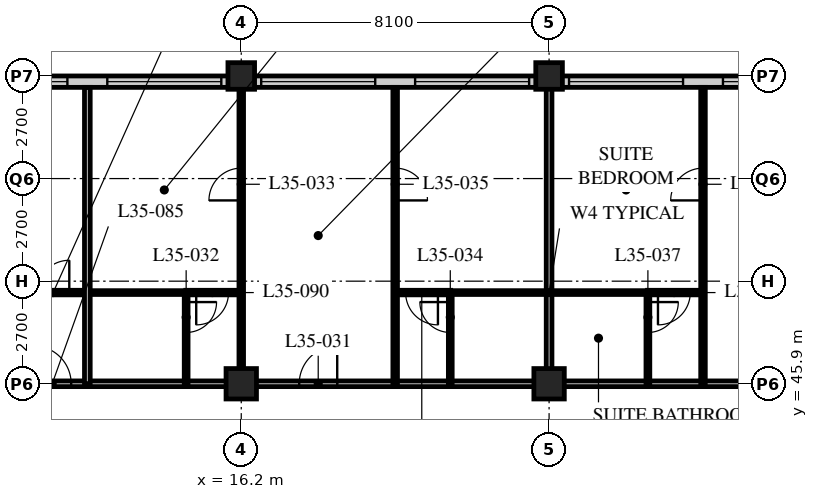
"""IFC4 building model, lengths in metres.
Left out: names, types, materials, properties, quantities, classifications, styles, units other than length and angle.
Written with IfcOpenShell. Run it as: python <this file> out.ifc"""

import sys

from ifc_helpers import new_model, si_unit, direction, frame, frame_2d, origin, origin_2d, place, context, subcontext, project, spatial, rectangle, hollow_rectangle, extrude, element, fill, save


model = new_model("IFC4")
c1 = context("Model", 3, precision=1e-05, world=origin(), true_north=direction((0.0, 1.0)))
c2 = subcontext(c1, "Body", "Model", "MODEL_VIEW")
j1 = project(units=[si_unit("LENGTHUNIT", "METRE"), si_unit("PLANEANGLEUNIT", "RADIAN")], contexts=[c1])
p1 = place(None, origin())
s1 = spatial("IfcSite", under=j1, at=p1, CompositionType="ELEMENT")
p2 = place(p1, origin())
s2 = spatial("IfcBuilding", under=s1, at=p2, CompositionType="ELEMENT")
p3 = place(p2, frame((0.0, 0.0, 137.4)))
s3 = spatial("IfcBuildingStorey", under=s2, at=p3, CompositionType="ELEMENT", Elevation=137.4)
p4 = place(p3, frame((16.2, 45.9, 0.0), z_axis=(0.0, 0.0, 1.0), x_axis=(1.0, 0.0, 0.0)))
e1 = element("IfcColumn", 1, at=p4, inside=s3, PredefinedType="COLUMN", context=c2, shape_type="SweptSolid", body=[
    extrude(hollow_rectangle(XDim=0.8, YDim=0.8, WallThickness=0.08, at=origin_2d()), origin(), (0.0, 0.0, 1.0), 3.4),
])
p5 = place(p3, frame((16.2, 54.0, 0.0), z_axis=(0.0, 0.0, 1.0), x_axis=(1.0, 0.0, 0.0)))
e2 = element("IfcColumn", 2, at=p5, inside=s3, PredefinedType="COLUMN", context=c2, shape_type="SweptSolid", body=[
    extrude(hollow_rectangle(XDim=0.7, YDim=0.7, WallThickness=0.07, at=origin_2d()), origin(), (0.0, 0.0, 1.0), 3.4),
])
p6 = place(p3, frame((24.3, 45.9, 0.0), z_axis=(0.0, 0.0, 1.0), x_axis=(1.0, 0.0, 0.0)))
e3 = element("IfcColumn", 3, at=p6, inside=s3, PredefinedType="COLUMN", context=c2, shape_type="SweptSolid", body=[
    extrude(hollow_rectangle(XDim=0.8, YDim=0.8, WallThickness=0.08, at=origin_2d()), origin(), (0.0, 0.0, 1.0), 3.4),
])
p7 = place(p3, frame((24.3, 54.0, 0.0), z_axis=(0.0, 0.0, 1.0), x_axis=(1.0, 0.0, 0.0)))
e4 = element("IfcColumn", 4, at=p7, inside=s3, PredefinedType="COLUMN", context=c2, shape_type="SweptSolid", body=[
    extrude(hollow_rectangle(XDim=0.7, YDim=0.7, WallThickness=0.07, at=origin_2d()), origin(), (0.0, 0.0, 1.0), 3.4),
])
p8 = place(p3, frame((48.3, 53.85, 0.0), z_axis=(0.0, 0.0, 1.0), x_axis=(-1.0, 0.0, 0.0)))
e5 = element("IfcWall", 5, at=p8, inside=s3, PredefinedType="SOLIDWALL", context=c2, shape_type="SweptSolid", body=[
    extrude(rectangle(XDim=40.2, YDim=0.3, at=frame_2d((20.1, 0.0))), origin(), (0.0, 0.0, 1.0), 3.19),
])
p9 = place(p8, frame((0.225, 0.0, 0.9)))
e6 = element("IfcOpeningElement", 6, at=p9, cuts=e5, PredefinedType="OPENING", context=c2, shape_type="SweptSolid", body=[
    extrude(rectangle(XDim=3.0, YDim=2.0, at=frame_2d((1.5, 1.0))), frame((0.0, 0.16, 0.0), z_axis=(0.0, -1.0, 0.0), x_axis=(1.0, 0.0, 0.0)), (0.0, 0.0, 1.0), 0.32),
])
p10 = place(p8, frame((4.275, 0.0, 0.9)))
e7 = element("IfcOpeningElement", 7, at=p10, cuts=e5, PredefinedType="OPENING", context=c2, shape_type="SweptSolid", body=[
    extrude(rectangle(XDim=3.0, YDim=2.0, at=frame_2d((1.5, 1.0))), frame((0.0, 0.16, 0.0), z_axis=(0.0, -1.0, 0.0), x_axis=(1.0, 0.0, 0.0)), (0.0, 0.0, 1.0), 0.32),
])
p11 = place(p8, frame((8.325, 0.0, 0.9)))
e8 = element("IfcOpeningElement", 8, at=p11, cuts=e5, PredefinedType="OPENING", context=c2, shape_type="SweptSolid", body=[
    extrude(rectangle(XDim=3.0, YDim=2.0, at=frame_2d((1.5, 1.0))), frame((0.0, 0.16, 0.0), z_axis=(0.0, -1.0, 0.0), x_axis=(1.0, 0.0, 0.0)), (0.0, 0.0, 1.0), 0.32),
])
p12 = place(p8, frame((12.375, 0.0, 0.9)))
e9 = element("IfcOpeningElement", 9, at=p12, cuts=e5, PredefinedType="OPENING", context=c2, shape_type="SweptSolid", body=[
    extrude(rectangle(XDim=3.0, YDim=2.0, at=frame_2d((1.5, 1.0))), frame((0.0, 0.16, 0.0), z_axis=(0.0, -1.0, 0.0), x_axis=(1.0, 0.0, 0.0)), (0.0, 0.0, 1.0), 0.32),
])
p13 = place(p8, frame((16.425, 0.0, 0.9)))
e10 = element("IfcOpeningElement", 10, at=p13, cuts=e5, PredefinedType="OPENING", context=c2, shape_type="SweptSolid", body=[
    extrude(rectangle(XDim=3.0, YDim=2.0, at=frame_2d((1.5, 1.0))), frame((0.0, 0.16, 0.0), z_axis=(0.0, -1.0, 0.0), x_axis=(1.0, 0.0, 0.0)), (0.0, 0.0, 1.0), 0.32),
])
p14 = place(p8, frame((20.475, 0.0, 0.9)))
e11 = element("IfcOpeningElement", 11, at=p14, cuts=e5, PredefinedType="OPENING", context=c2, shape_type="SweptSolid", body=[
    extrude(rectangle(XDim=3.0, YDim=2.0, at=frame_2d((1.5, 1.0))), frame((0.0, 0.16, 0.0), z_axis=(0.0, -1.0, 0.0), x_axis=(1.0, 0.0, 0.0)), (0.0, 0.0, 1.0), 0.32),
])
p15 = place(p8, frame((24.525, 0.0, 0.9)))
e12 = element("IfcOpeningElement", 12, at=p15, cuts=e5, PredefinedType="OPENING", context=c2, shape_type="SweptSolid", body=[
    extrude(rectangle(XDim=3.0, YDim=2.0, at=frame_2d((1.5, 1.0))), frame((0.0, 0.16, 0.0), z_axis=(0.0, -1.0, 0.0), x_axis=(1.0, 0.0, 0.0)), (0.0, 0.0, 1.0), 0.32),
])
p16 = place(p8, frame((28.575, 0.0, 0.9)))
e13 = element("IfcOpeningElement", 13, at=p16, cuts=e5, PredefinedType="OPENING", context=c2, shape_type="SweptSolid", body=[
    extrude(rectangle(XDim=3.0, YDim=2.0, at=frame_2d((1.5, 1.0))), frame((0.0, 0.16, 0.0), z_axis=(0.0, -1.0, 0.0), x_axis=(1.0, 0.0, 0.0)), (0.0, 0.0, 1.0), 0.32),
])
p17 = place(p8, frame((32.625, 0.0, 0.9)))
e14 = element("IfcOpeningElement", 14, at=p17, cuts=e5, PredefinedType="OPENING", context=c2, shape_type="SweptSolid", body=[
    extrude(rectangle(XDim=3.0, YDim=2.0, at=frame_2d((1.5, 1.0))), frame((0.0, 0.16, 0.0), z_axis=(0.0, -1.0, 0.0), x_axis=(1.0, 0.0, 0.0)), (0.0, 0.0, 1.0), 0.32),
])
p18 = place(p8, frame((36.675, 0.0, 0.9)))
e15 = element("IfcOpeningElement", 15, at=p18, cuts=e5, PredefinedType="OPENING", context=c2, shape_type="SweptSolid", body=[
    extrude(rectangle(XDim=3.0, YDim=2.0, at=frame_2d((1.5, 1.0))), frame((0.0, 0.16, 0.0), z_axis=(0.0, -1.0, 0.0), x_axis=(1.0, 0.0, 0.0)), (0.0, 0.0, 1.0), 0.32),
])
p19 = place(p3, frame((8.1, 45.9, 0.0), z_axis=(0.0, 0.0, 1.0), x_axis=(1.0, 0.0, 0.0)))
e16 = element("IfcWall", 16, at=p19, inside=s3, PredefinedType="PARTITIONING", context=c2, shape_type="SweptSolid", body=[
    extrude(rectangle(XDim=36.45, YDim=0.15, at=frame_2d((18.225, 0.0))), origin(), (0.0, 0.0, 1.0), 2.578),
])
p20 = place(p19, frame((9.625, 0.0, 0.0)))
e17 = element("IfcOpeningElement", 17, at=p20, cuts=e16, PredefinedType="OPENING", context=c2, shape_type="SweptSolid", body=[
    extrude(rectangle(XDim=1.0, YDim=2.1, at=frame_2d((0.5, 1.05))), frame((0.0, 0.085, 0.0), z_axis=(0.0, -1.0, 0.0), x_axis=(1.0, 0.0, 0.0)), (0.0, 0.0, 1.0), 0.17),
])
p21 = place(p19, frame((21.775, 0.0, 0.0)))
e18 = element("IfcOpeningElement", 18, at=p21, cuts=e16, PredefinedType="OPENING", context=c2, shape_type="SweptSolid", body=[
    extrude(rectangle(XDim=1.0, YDim=2.1, at=frame_2d((0.5, 1.05))), frame((0.0, 0.085, 0.0), z_axis=(0.0, -1.0, 0.0), x_axis=(1.0, 0.0, 0.0)), (0.0, 0.0, 1.0), 0.17),
])
p22 = place(p19, frame((28.95, 0.0, 0.0)))
e19 = element("IfcOpeningElement", 19, at=p22, cuts=e16, PredefinedType="OPENING", context=c2, shape_type="SweptSolid", body=[
    extrude(rectangle(XDim=1.0, YDim=2.1, at=frame_2d((0.5, 1.05))), frame((0.0, 0.085, 0.0), z_axis=(0.0, -1.0, 0.0), x_axis=(1.0, 0.0, 0.0)), (0.0, 0.0, 1.0), 0.17),
])
p23 = place(p19, frame((33.925, 0.0, 0.0)))
e20 = element("IfcOpeningElement", 20, at=p23, cuts=e16, PredefinedType="OPENING", context=c2, shape_type="SweptSolid", body=[
    extrude(rectangle(XDim=1.0, YDim=2.1, at=frame_2d((0.5, 1.05))), frame((0.0, 0.085, 0.0), z_axis=(0.0, -1.0, 0.0), x_axis=(1.0, 0.0, 0.0)), (0.0, 0.0, 1.0), 0.17),
])
p24 = place(p19, frame((2.625, 0.0, 0.0)))
e21 = element("IfcOpeningElement", 21, at=p24, cuts=e16, PredefinedType="OPENING", context=c2, shape_type="SweptSolid", body=[
    extrude(rectangle(XDim=1.0, YDim=2.1, at=frame_2d((0.5, 1.05))), frame((0.0, 0.085, 0.0), z_axis=(0.0, -1.0, 0.0), x_axis=(1.0, 0.0, 0.0)), (0.0, 0.0, 1.0), 0.17),
])
p25 = place(p3, frame((12.15, 48.3, 0.0), z_axis=(0.0, 0.0, 1.0), x_axis=(1.0, 0.0, 0.0)))
e22 = element("IfcWall", 22, at=p25, inside=s3, PredefinedType="PARTITIONING", context=c2, shape_type="SweptSolid", body=[
    extrude(rectangle(XDim=2.6, YDim=0.1, at=frame_2d((1.3, 0.0))), origin(), (0.0, 0.0, 1.0), 3.19),
])
p26 = place(p3, frame((14.75, 45.9, 0.0), z_axis=(0.0, 0.0, 1.0), x_axis=(0.0, 1.0, 0.0)))
e23 = element("IfcWall", 23, at=p26, inside=s3, PredefinedType="PARTITIONING", context=c2, shape_type="SweptSolid", body=[
    extrude(rectangle(XDim=2.4, YDim=0.1, at=frame_2d((1.2, 0.0))), origin(), (0.0, 0.0, 1.0), 3.19),
])
p27 = place(p26, frame((1.35, 0.0, 0.0)))
e24 = element("IfcOpeningElement", 24, at=p27, cuts=e23, PredefinedType="OPENING", context=c2, shape_type="SweptSolid", body=[
    extrude(rectangle(XDim=0.8, YDim=2.1, at=frame_2d((0.4, 1.05))), frame((0.0, 0.06, 0.0), z_axis=(0.0, -1.0, 0.0), x_axis=(1.0, 0.0, 0.0)), (0.0, 0.0, 1.0), 0.12),
])
p28 = place(p3, frame((16.2, 45.9, 0.0), z_axis=(0.0, 0.0, 1.0), x_axis=(0.0, 1.0, 0.0)))
e25 = element("IfcWall", 25, at=p28, inside=s3, PredefinedType="PARTITIONING", context=c2, shape_type="SweptSolid", body=[
    extrude(rectangle(XDim=7.8, YDim=0.12, at=frame_2d((3.9, 0.0))), origin(), (0.0, 0.0, 1.0), 2.578),
])
p29 = place(p28, frame((4.825, 0.0, 0.0)))
e26 = element("IfcOpeningElement", 26, at=p29, cuts=e25, PredefinedType="OPENING", context=c2, shape_type="SweptSolid", body=[
    extrude(rectangle(XDim=0.85, YDim=2.1, at=frame_2d((0.425, 1.05))), frame((0.0, 0.07, 0.0), z_axis=(0.0, -1.0, 0.0), x_axis=(1.0, 0.0, 0.0)), (0.0, 0.0, 1.0), 0.14),
])
p30 = place(p3, frame((21.7, 48.3, 0.0), z_axis=(0.0, 0.0, 1.0), x_axis=(1.0, 0.0, 0.0)))
e27 = element("IfcWall", 27, at=p30, inside=s3, PredefinedType="PARTITIONING", context=c2, shape_type="SweptSolid", body=[
    extrude(rectangle(XDim=5.2, YDim=0.1, at=frame_2d((2.6, 0.0))), origin(), (0.0, 0.0, 1.0), 3.19),
])
p31 = place(p3, frame((21.7, 45.9, 0.0), z_axis=(0.0, 0.0, 1.0), x_axis=(0.0, 1.0, 0.0)))
e28 = element("IfcWall", 28, at=p31, inside=s3, PredefinedType="PARTITIONING", context=c2, shape_type="SweptSolid", body=[
    extrude(rectangle(XDim=2.4, YDim=0.1, at=frame_2d((1.2, 0.0))), origin(), (0.0, 0.0, 1.0), 3.19),
])
p32 = place(p31, frame((1.35, 0.0, 0.0)))
e29 = element("IfcOpeningElement", 29, at=p32, cuts=e28, PredefinedType="OPENING", context=c2, shape_type="SweptSolid", body=[
    extrude(rectangle(XDim=0.8, YDim=2.1, at=frame_2d((0.4, 1.05))), frame((0.0, 0.06, 0.0), z_axis=(0.0, -1.0, 0.0), x_axis=(1.0, 0.0, 0.0)), (0.0, 0.0, 1.0), 0.12),
])
p33 = place(p3, frame((20.25, 45.9, 0.0), z_axis=(0.0, 0.0, 1.0), x_axis=(0.0, 1.0, 0.0)))
e30 = element("IfcWall", 30, at=p33, inside=s3, PredefinedType="PARTITIONING", context=c2, shape_type="SweptSolid", body=[
    extrude(rectangle(XDim=7.8, YDim=0.12, at=frame_2d((3.9, 0.0))), origin(), (0.0, 0.0, 1.0), 3.19),
])
p34 = place(p33, frame((4.825, 0.0, 0.0)))
e31 = element("IfcOpeningElement", 31, at=p34, cuts=e30, PredefinedType="OPENING", context=c2, shape_type="SweptSolid", body=[
    extrude(rectangle(XDim=0.85, YDim=2.1, at=frame_2d((0.425, 1.05))), frame((0.0, 0.07, 0.0), z_axis=(0.0, -1.0, 0.0), x_axis=(1.0, 0.0, 0.0)), (0.0, 0.0, 1.0), 0.14),
])
p35 = place(p3, frame((24.3, 45.9, 0.0), z_axis=(0.0, 0.0, 1.0), x_axis=(0.0, 1.0, 0.0)))
e32 = element("IfcWall", 32, at=p35, inside=s3, PredefinedType="PARTITIONING", context=c2, shape_type="SweptSolid", body=[
    extrude(rectangle(XDim=7.8, YDim=0.15, at=frame_2d((3.9, 0.0))), origin(), (0.0, 0.0, 1.0), 2.578),
])
p36 = place(p3, frame((26.9, 45.9, 0.0), z_axis=(0.0, 0.0, 1.0), x_axis=(0.0, 1.0, 0.0)))
e33 = element("IfcWall", 33, at=p36, inside=s3, PredefinedType="PARTITIONING", context=c2, shape_type="SweptSolid", body=[
    extrude(rectangle(XDim=2.4, YDim=0.1, at=frame_2d((1.2, 0.0))), origin(), (0.0, 0.0, 1.0), 3.19),
])
p37 = place(p36, frame((1.35, 0.0, 0.0)))
e34 = element("IfcOpeningElement", 34, at=p37, cuts=e33, PredefinedType="OPENING", context=c2, shape_type="SweptSolid", body=[
    extrude(rectangle(XDim=0.8, YDim=2.1, at=frame_2d((0.4, 1.05))), frame((0.0, 0.06, 0.0), z_axis=(0.0, -1.0, 0.0), x_axis=(1.0, 0.0, 0.0)), (0.0, 0.0, 1.0), 0.12),
])
p38 = place(p3, frame((28.35, 45.9, 0.0), z_axis=(0.0, 0.0, 1.0), x_axis=(0.0, 1.0, 0.0)))
e35 = element("IfcWall", 35, at=p38, inside=s3, PredefinedType="PARTITIONING", context=c2, shape_type="SweptSolid", body=[
    extrude(rectangle(XDim=7.8, YDim=0.12, at=frame_2d((3.9, 0.0))), origin(), (0.0, 0.0, 1.0), 3.19),
])
p39 = place(p38, frame((4.825, 0.0, 0.0)))
e36 = element("IfcOpeningElement", 36, at=p39, cuts=e35, PredefinedType="OPENING", context=c2, shape_type="SweptSolid", body=[
    extrude(rectangle(XDim=0.85, YDim=2.1, at=frame_2d((0.425, 1.05))), frame((0.0, 0.07, 0.0), z_axis=(0.0, -1.0, 0.0), x_axis=(1.0, 0.0, 0.0)), (0.0, 0.0, 1.0), 0.14),
])
p40 = place(p3, frame((8.1, 48.3, 0.0), z_axis=(0.0, 0.0, 1.0), x_axis=(1.0, 0.0, 0.0)))
e37 = element("IfcWall", 37, at=p40, inside=s3, PredefinedType="PARTITIONING", context=c2, shape_type="SweptSolid", body=[
    extrude(rectangle(XDim=4.05, YDim=0.12, at=frame_2d((2.025, 0.0))), origin(), (0.0, 0.0, 1.0), 3.19),
])
p41 = place(p40, frame((2.725, 0.0, 0.0)))
e38 = element("IfcOpeningElement", 38, at=p41, cuts=e37, PredefinedType="OPENING", context=c2, shape_type="SweptSolid", body=[
    extrude(rectangle(XDim=0.85, YDim=2.1, at=frame_2d((0.425, 1.05))), frame((0.0, 0.07, 0.0), z_axis=(0.0, -1.0, 0.0), x_axis=(1.0, 0.0, 0.0)), (0.0, 0.0, 1.0), 0.14),
])
p42 = place(p3, frame((12.15, 45.9, 0.0), z_axis=(0.0, 0.0, 1.0), x_axis=(0.0, 1.0, 0.0)))
e39 = element("IfcWall", 39, at=p42, inside=s3, PredefinedType="PARTITIONING", context=c2, shape_type="SweptSolid", body=[
    extrude(rectangle(XDim=7.8, YDim=0.15, at=frame_2d((3.9, 0.0))), origin(), (0.0, 0.0, 1.0), 3.19),
])
p43 = place(p3, frame((14.74, 48.3, 0.0), z_axis=(0.0, 0.0, 1.0), x_axis=(1.0, 0.0, 0.0)))
e40 = element("IfcWall", 40, at=p43, inside=s3, PredefinedType="PARTITIONING", context=c2, shape_type="SweptSolid", body=[
    extrude(rectangle(XDim=1.46, YDim=0.12, at=frame_2d((0.73, 0.0))), origin(), (0.0, 0.0, 1.0), 3.19),
])
p44 = place(p43, frame((0.275, 0.0, 0.0)))
e41 = element("IfcOpeningElement", 41, at=p44, cuts=e40, PredefinedType="OPENING", context=c2, shape_type="SweptSolid", body=[
    extrude(rectangle(XDim=0.85, YDim=2.1, at=frame_2d((0.425, 1.05))), frame((0.0, 0.07, 0.0), z_axis=(0.0, -1.0, 0.0), x_axis=(1.0, 0.0, 0.0)), (0.0, 0.0, 1.0), 0.14),
])
p45 = place(p3, frame((20.25, 48.3, 0.0), z_axis=(0.0, 0.0, 1.0), x_axis=(1.0, 0.0, 0.0)))
e42 = element("IfcWall", 42, at=p45, inside=s3, PredefinedType="PARTITIONING", context=c2, shape_type="SweptSolid", body=[
    extrude(rectangle(XDim=1.46, YDim=0.12, at=frame_2d((0.73, 0.0))), origin(), (0.0, 0.0, 1.0), 3.19),
])
p46 = place(p45, frame((0.275, 0.0, 0.0)))
e43 = element("IfcOpeningElement", 43, at=p46, cuts=e42, PredefinedType="OPENING", context=c2, shape_type="SweptSolid", body=[
    extrude(rectangle(XDim=0.85, YDim=2.1, at=frame_2d((0.425, 1.05))), frame((0.0, 0.07, 0.0), z_axis=(0.0, -1.0, 0.0), x_axis=(1.0, 0.0, 0.0)), (0.0, 0.0, 1.0), 0.14),
])
p47 = place(p3, frame((26.89, 48.3, 0.0), z_axis=(0.0, 0.0, 1.0), x_axis=(1.0, 0.0, 0.0)))
e44 = element("IfcWall", 44, at=p47, inside=s3, PredefinedType="PARTITIONING", context=c2, shape_type="SweptSolid", body=[
    extrude(rectangle(XDim=1.46, YDim=0.12, at=frame_2d((0.73, 0.0))), origin(), (0.0, 0.0, 1.0), 3.19),
])
p48 = place(p47, frame((0.275, 0.0, 0.0)))
e45 = element("IfcOpeningElement", 45, at=p48, cuts=e44, PredefinedType="OPENING", context=c2, shape_type="SweptSolid", body=[
    extrude(rectangle(XDim=0.85, YDim=2.1, at=frame_2d((0.425, 1.05))), frame((0.0, 0.07, 0.0), z_axis=(0.0, -1.0, 0.0), x_axis=(1.0, 0.0, 0.0)), (0.0, 0.0, 1.0), 0.14),
])
p49 = place(p13, origin())
e46 = element("IfcWindow", 46, at=p49, inside=s3, PartitioningType="SINGLE_PANEL", PredefinedType="WINDOW", context=c2, shape_type="SweptSolid", body=[
    extrude(rectangle(XDim=3.0, YDim=2.0, at=frame_2d((1.5, 1.0))), frame((0.0, 0.03, 0.0), z_axis=(0.0, -1.0, 0.0), x_axis=(1.0, 0.0, 0.0)), (0.0, 0.0, 1.0), 0.06),
])
fill(e10, e46)
p50 = place(p14, origin())
e47 = element("IfcWindow", 47, at=p50, inside=s3, PartitioningType="SINGLE_PANEL", PredefinedType="WINDOW", context=c2, shape_type="SweptSolid", body=[
    extrude(rectangle(XDim=3.0, YDim=2.0, at=frame_2d((1.5, 1.0))), frame((0.0, 0.03, 0.0), z_axis=(0.0, -1.0, 0.0), x_axis=(1.0, 0.0, 0.0)), (0.0, 0.0, 1.0), 0.06),
])
fill(e11, e47)
p51 = place(p15, origin())
e48 = element("IfcWindow", 48, at=p51, inside=s3, PartitioningType="SINGLE_PANEL", PredefinedType="WINDOW", context=c2, shape_type="SweptSolid", body=[
    extrude(rectangle(XDim=3.0, YDim=2.0, at=frame_2d((1.5, 1.0))), frame((0.0, 0.03, 0.0), z_axis=(0.0, -1.0, 0.0), x_axis=(1.0, 0.0, 0.0)), (0.0, 0.0, 1.0), 0.06),
])
fill(e12, e48)
p52 = place(p16, origin())
e49 = element("IfcWindow", 49, at=p52, inside=s3, PartitioningType="SINGLE_PANEL", PredefinedType="WINDOW", context=c2, shape_type="SweptSolid", body=[
    extrude(rectangle(XDim=3.0, YDim=2.0, at=frame_2d((1.5, 1.0))), frame((0.0, 0.03, 0.0), z_axis=(0.0, -1.0, 0.0), x_axis=(1.0, 0.0, 0.0)), (0.0, 0.0, 1.0), 0.06),
])
fill(e13, e49)
p53 = place(p17, origin())
e50 = element("IfcWindow", 50, at=p53, inside=s3, PartitioningType="SINGLE_PANEL", PredefinedType="WINDOW", context=c2, shape_type="SweptSolid", body=[
    extrude(rectangle(XDim=3.0, YDim=2.0, at=frame_2d((1.5, 1.0))), frame((0.0, 0.03, 0.0), z_axis=(0.0, -1.0, 0.0), x_axis=(1.0, 0.0, 0.0)), (0.0, 0.0, 1.0), 0.06),
])
fill(e14, e50)
p54 = place(p18, origin())
e51 = element("IfcWindow", 51, at=p54, inside=s3, PartitioningType="SINGLE_PANEL", PredefinedType="WINDOW", context=c2, shape_type="SweptSolid", body=[
    extrude(rectangle(XDim=3.0, YDim=2.0, at=frame_2d((1.5, 1.0))), frame((0.0, 0.03, 0.0), z_axis=(0.0, -1.0, 0.0), x_axis=(1.0, 0.0, 0.0)), (0.0, 0.0, 1.0), 0.06),
])
fill(e15, e51)
p55 = place(p20, origin())
e52 = element("IfcDoor", 52, at=p55, inside=s3, OperationType="SINGLE_SWING_RIGHT", PredefinedType="DOOR", context=c2, shape_type="SweptSolid", body=[
    extrude(rectangle(XDim=1.0, YDim=2.1, at=frame_2d((0.5, 1.05))), frame((0.0, 0.025, 0.0), z_axis=(0.0, -1.0, 0.0), x_axis=(1.0, 0.0, 0.0)), (0.0, 0.0, 1.0), 0.05),
])
fill(e17, e52)
p56 = place(p27, origin())
e53 = element("IfcDoor", 53, at=p56, inside=s3, OperationType="SINGLE_SWING_LEFT", PredefinedType="DOOR", context=c2, shape_type="SweptSolid", body=[
    extrude(rectangle(XDim=0.8, YDim=2.1, at=frame_2d((0.4, 1.05))), frame((0.0, 0.025, 0.0), z_axis=(0.0, -1.0, 0.0), x_axis=(1.0, 0.0, 0.0)), (0.0, 0.0, 1.0), 0.05),
])
fill(e24, e53)
p57 = place(p29, origin())
e54 = element("IfcDoor", 54, at=p57, inside=s3, OperationType="SINGLE_SWING_LEFT", PredefinedType="DOOR", context=c2, shape_type="SweptSolid", body=[
    extrude(rectangle(XDim=0.85, YDim=2.1, at=frame_2d((0.425, 1.05))), frame((0.0, 0.025, 0.0), z_axis=(0.0, -1.0, 0.0), x_axis=(1.0, 0.0, 0.0)), (0.0, 0.0, 1.0), 0.05),
])
fill(e26, e54)
p58 = place(p32, origin())
e55 = element("IfcDoor", 55, at=p58, inside=s3, OperationType="SINGLE_SWING_RIGHT", PredefinedType="DOOR", context=c2, shape_type="SweptSolid", body=[
    extrude(rectangle(XDim=0.8, YDim=2.1, at=frame_2d((0.4, 1.05))), frame((0.0, 0.025, 0.0), z_axis=(0.0, -1.0, 0.0), x_axis=(1.0, 0.0, 0.0)), (0.0, 0.0, 1.0), 0.05),
])
fill(e29, e55)
p59 = place(p34, origin())
e56 = element("IfcDoor", 56, at=p59, inside=s3, OperationType="SINGLE_SWING_RIGHT", PredefinedType="DOOR", context=c2, shape_type="SweptSolid", body=[
    extrude(rectangle(XDim=0.85, YDim=2.1, at=frame_2d((0.425, 1.05))), frame((0.0, 0.025, 0.0), z_axis=(0.0, -1.0, 0.0), x_axis=(1.0, 0.0, 0.0)), (0.0, 0.0, 1.0), 0.05),
])
fill(e31, e56)
p60 = place(p37, origin())
e57 = element("IfcDoor", 57, at=p60, inside=s3, OperationType="SINGLE_SWING_LEFT", PredefinedType="DOOR", context=c2, shape_type="SweptSolid", body=[
    extrude(rectangle(XDim=0.8, YDim=2.1, at=frame_2d((0.4, 1.05))), frame((0.0, 0.025, 0.0), z_axis=(0.0, -1.0, 0.0), x_axis=(1.0, 0.0, 0.0)), (0.0, 0.0, 1.0), 0.05),
])
fill(e34, e57)
p61 = place(p39, origin())
e58 = element("IfcDoor", 58, at=p61, inside=s3, OperationType="SINGLE_SWING_LEFT", PredefinedType="DOOR", context=c2, shape_type="SweptSolid", body=[
    extrude(rectangle(XDim=0.85, YDim=2.1, at=frame_2d((0.425, 1.05))), frame((0.0, 0.025, 0.0), z_axis=(0.0, -1.0, 0.0), x_axis=(1.0, 0.0, 0.0)), (0.0, 0.0, 1.0), 0.05),
])
fill(e36, e58)
p62 = place(p24, origin())
e59 = element("IfcDoor", 59, at=p62, inside=s3, OperationType="SINGLE_SWING_LEFT", PredefinedType="DOOR", context=c2, shape_type="SweptSolid", body=[
    extrude(rectangle(XDim=1.0, YDim=2.1, at=frame_2d((0.5, 1.05))), frame((0.0, 0.025, 0.0), z_axis=(0.0, -1.0, 0.0), x_axis=(1.0, 0.0, 0.0)), (0.0, 0.0, 1.0), 0.05),
])
fill(e21, e59)
p63 = place(p41, origin())
e60 = element("IfcDoor", 60, at=p63, inside=s3, OperationType="SINGLE_SWING_RIGHT", PredefinedType="DOOR", context=c2, shape_type="SweptSolid", body=[
    extrude(rectangle(XDim=0.85, YDim=2.1, at=frame_2d((0.425, 1.05))), frame((0.0, 0.025, 0.0), z_axis=(0.0, -1.0, 0.0), x_axis=(1.0, 0.0, 0.0)), (0.0, 0.0, 1.0), 0.05),
])
fill(e38, e60)
p64 = place(p44, origin())
e61 = element("IfcDoor", 61, at=p64, inside=s3, OperationType="SINGLE_SWING_RIGHT", PredefinedType="DOOR", context=c2, shape_type="SweptSolid", body=[
    extrude(rectangle(XDim=0.85, YDim=2.1, at=frame_2d((0.425, 1.05))), frame((0.0, 0.025, 0.0), z_axis=(0.0, -1.0, 0.0), x_axis=(1.0, 0.0, 0.0)), (0.0, 0.0, 1.0), 0.05),
])
fill(e41, e61)
p65 = place(p46, origin())
e62 = element("IfcDoor", 62, at=p65, inside=s3, OperationType="SINGLE_SWING_LEFT", PredefinedType="DOOR", context=c2, shape_type="SweptSolid", body=[
    extrude(rectangle(XDim=0.85, YDim=2.1, at=frame_2d((0.425, 1.05))), frame((0.0, 0.025, 0.0), z_axis=(0.0, -1.0, 0.0), x_axis=(1.0, 0.0, 0.0)), (0.0, 0.0, 1.0), 0.05),
])
fill(e43, e62)
p66 = place(p48, origin())
e63 = element("IfcDoor", 63, at=p66, inside=s3, OperationType="SINGLE_SWING_RIGHT", PredefinedType="DOOR", context=c2, shape_type="SweptSolid", body=[
    extrude(rectangle(XDim=0.85, YDim=2.1, at=frame_2d((0.425, 1.05))), frame((0.0, 0.025, 0.0), z_axis=(0.0, -1.0, 0.0), x_axis=(1.0, 0.0, 0.0)), (0.0, 0.0, 1.0), 0.05),
])
fill(e45, e63)
save(model, sys.argv[1])
